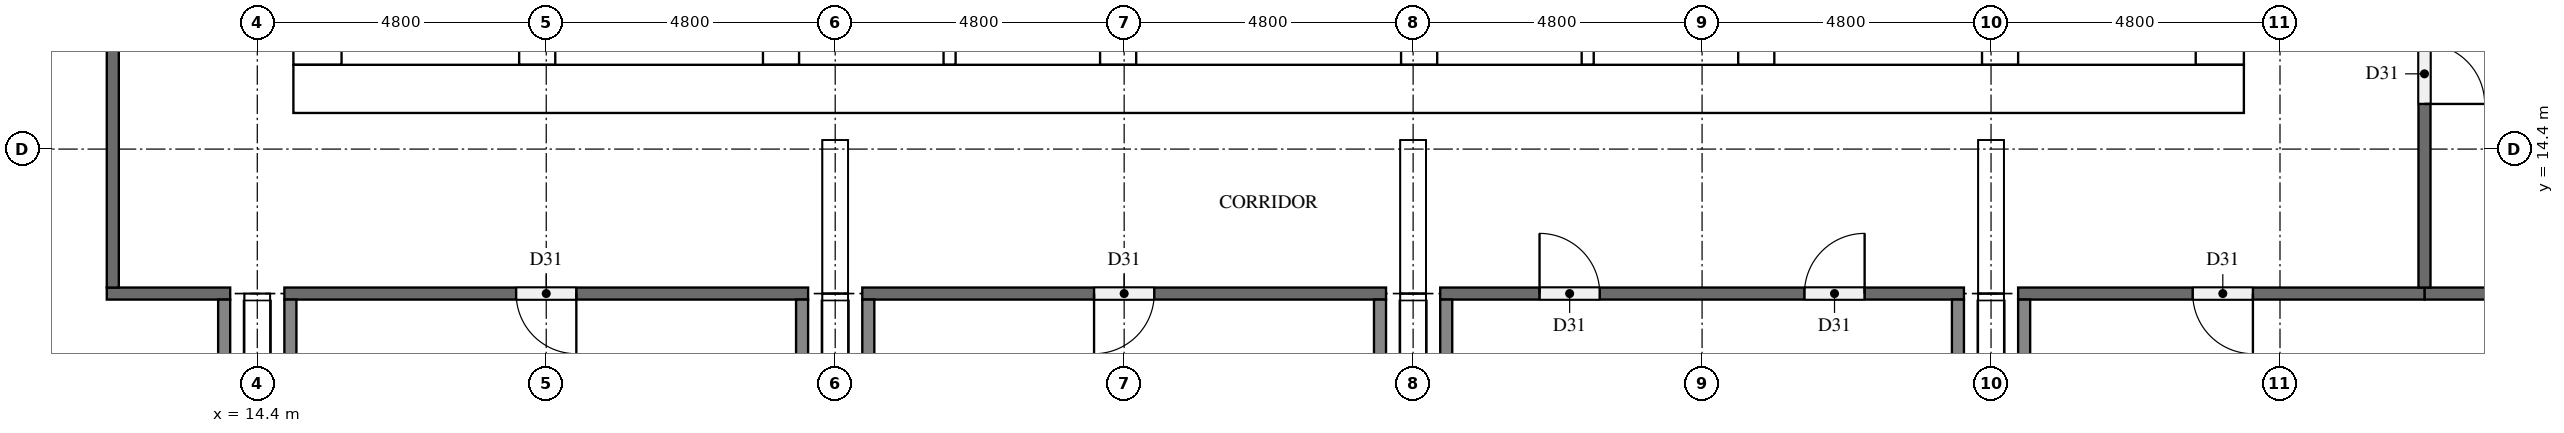
"""IFC4 building model, lengths in metres.
Left out: names, types, materials, properties, quantities, classifications, styles, units other than length and angle.
Written with IfcOpenShell. Run it as: python <this file> out.ifc"""

import sys

from ifc_helpers import new_model, si_unit, direction, frame, frame_2d, origin, place, context, subcontext, project, spatial, rectangle, extrude, element, fill, save


model = new_model("IFC4")
c1 = context("Model", 3, precision=1e-05, world=origin(), true_north=direction((0.0, 1.0)))
c2 = subcontext(c1, "Body", "Model", "MODEL_VIEW")
j1 = project(units=[si_unit("LENGTHUNIT", "METRE"), si_unit("PLANEANGLEUNIT", "RADIAN")], contexts=[c1])
p1 = place(None, origin())
s1 = spatial("IfcSite", under=j1, at=p1, CompositionType="ELEMENT")
p2 = place(p1, origin())
s2 = spatial("IfcBuilding", under=s1, at=p2, CompositionType="ELEMENT")
p3 = place(p2, frame((0.0, 0.0, 143.6)))
s3 = spatial("IfcBuildingStorey", under=s2, at=p3, CompositionType="ELEMENT", Elevation=143.6)
p4 = place(p3, frame((15.0, 15.4, 0.0), z_axis=(0.0, 0.0, 1.0), x_axis=(1.0, 0.0, 0.0)))
e1 = element("IfcWall", 1, at=p4, inside=s3, PredefinedType="SHEAR", context=c2, shape_type="SweptSolid", body=[
    extrude(rectangle(XDim=32.4, YDim=0.8, at=frame_2d((16.2, 0.0))), origin(), (0.0, 0.0, 1.0), 5.1),
])
p5 = place(p4, frame((15.3, 0.0, 0.0)))
e2 = element("IfcOpeningElement", 2, at=p5, cuts=e1, PredefinedType="OPENING", context=c2, shape_type="SweptSolid", body=[
    extrude(rectangle(XDim=1.8, YDim=2.1, at=frame_2d((0.9, 1.05))), frame((0.0, 0.41, 0.0), z_axis=(0.0, -1.0, 0.0), x_axis=(1.0, 0.0, 0.0)), (0.0, 0.0, 1.0), 0.82),
])
p6 = place(p3, frame((15.4, 15.8, 0.0), z_axis=(0.0, 0.0, 1.0), x_axis=(0.0, 1.0, 0.0)))
e3 = element("IfcWall", 3, at=p6, inside=s3, PredefinedType="SHEAR", context=c2, shape_type="SweptSolid", body=[
    extrude(rectangle(XDim=21.2, YDim=0.8, at=frame_2d((10.6, 0.0))), origin(), (0.0, 0.0, 1.0), 5.1),
])
p7 = place(p6, frame((4.96, 0.0, 0.0)))
e4 = element("IfcOpeningElement", 4, at=p7, cuts=e3, PredefinedType="OPENING", context=c2, shape_type="SweptSolid", body=[
    extrude(rectangle(XDim=1.2, YDim=2.1, at=frame_2d((0.6, 1.05))), frame((0.0, 0.41, 0.0), z_axis=(0.0, -1.0, 0.0), x_axis=(1.0, 0.0, 0.0)), (0.0, 0.0, 1.0), 0.82),
])
p8 = place(p3, frame((47.0, 15.8, 0.0), z_axis=(0.0, 0.0, 1.0), x_axis=(0.0, 1.0, 0.0)))
e5 = element("IfcWall", 5, at=p8, inside=s3, PredefinedType="SHEAR", context=c2, shape_type="SweptSolid", body=[
    extrude(rectangle(XDim=21.2, YDim=0.8, at=frame_2d((10.6, 0.0))), origin(), (0.0, 0.0, 1.0), 5.1),
])
p9 = place(p8, frame((10.3, 0.0, 0.0)))
e6 = element("IfcOpeningElement", 6, at=p9, cuts=e5, PredefinedType="OPENING", context=c2, shape_type="SweptSolid", body=[
    extrude(rectangle(XDim=1.2, YDim=2.1, at=frame_2d((0.6, 1.05))), frame((0.0, 0.41, 0.0), z_axis=(0.0, -1.0, 0.0), x_axis=(1.0, 0.0, 0.0)), (0.0, 0.0, 1.0), 0.82),
])
p10 = place(p3, frame((19.05, 15.8, 0.0), z_axis=(0.0, 0.0, 1.0), x_axis=(0.0, 1.0, 0.0)))
e7 = element("IfcWall", 7, at=p10, inside=s3, PredefinedType="SHEAR", context=c2, shape_type="SweptSolid", body=[
    extrude(rectangle(XDim=15.15, YDim=0.6, at=frame_2d((7.575, 0.0))), origin(), (0.0, 0.0, 1.0), 5.1),
])
p11 = place(p10, frame((9.65, 0.0, 0.0)))
e8 = element("IfcOpeningElement", 8, at=p11, cuts=e7, PredefinedType="OPENING", context=c2, shape_type="SweptSolid", body=[
    extrude(rectangle(XDim=1.1, YDim=2.1, at=frame_2d((0.55, 1.05))), frame((0.0, 0.31, 0.0), z_axis=(0.0, -1.0, 0.0), x_axis=(1.0, 0.0, 0.0)), (0.0, 0.0, 1.0), 0.62),
])
p12 = place(p10, frame((13.15, 0.0, 0.0)))
e9 = element("IfcOpeningElement", 9, at=p12, cuts=e7, PredefinedType="OPENING", context=c2, shape_type="SweptSolid", body=[
    extrude(rectangle(XDim=1.1, YDim=2.1, at=frame_2d((0.55, 1.05))), frame((0.0, 0.31, 0.0), z_axis=(0.0, -1.0, 0.0), x_axis=(1.0, 0.0, 0.0)), (0.0, 0.0, 1.0), 0.62),
])
p13 = place(p10, frame((0.4, 0.0, 0.0)))
e10 = element("IfcOpeningElement", 10, at=p13, cuts=e7, PredefinedType="OPENING", context=c2, shape_type="SweptSolid", body=[
    extrude(rectangle(XDim=1.2, YDim=2.1, at=frame_2d((0.6, 1.05))), frame((0.0, 0.31, 0.0), z_axis=(0.0, -1.0, 0.0), x_axis=(1.0, 0.0, 0.0)), (0.0, 0.0, 1.0), 0.62),
])
p14 = place(p3, frame((23.1, 15.8, 0.0), z_axis=(0.0, 0.0, 1.0), x_axis=(0.0, 1.0, 0.0)))
e11 = element("IfcWall", 11, at=p14, inside=s3, PredefinedType="SHEAR", context=c2, shape_type="SweptSolid", body=[
    extrude(rectangle(XDim=21.2, YDim=0.6, at=frame_2d((10.6, 0.0))), origin(), (0.0, 0.0, 1.0), 5.1),
])
p15 = place(p3, frame((39.3, 15.8, 0.0), z_axis=(0.0, 0.0, 1.0), x_axis=(0.0, 1.0, 0.0)))
e12 = element("IfcWall", 12, at=p15, inside=s3, PredefinedType="SHEAR", context=c2, shape_type="SweptSolid", body=[
    extrude(rectangle(XDim=8.45, YDim=0.6, at=frame_2d((4.225, 0.0))), origin(), (0.0, 0.0, 1.0), 5.1),
])
p16 = place(p3, frame((43.35, 15.8, 0.0), z_axis=(0.0, 0.0, 1.0), x_axis=(0.0, 1.0, 0.0)))
e13 = element("IfcWall", 13, at=p16, inside=s3, PredefinedType="SHEAR", context=c2, shape_type="SweptSolid", body=[
    extrude(rectangle(XDim=8.45, YDim=0.6, at=frame_2d((4.225, 0.0))), origin(), (0.0, 0.0, 1.0), 5.1),
])
p17 = place(p16, frame((0.4, 0.0, 0.0)))
e14 = element("IfcOpeningElement", 14, at=p17, cuts=e13, PredefinedType="OPENING", context=c2, shape_type="SweptSolid", body=[
    extrude(rectangle(XDim=1.2, YDim=2.1, at=frame_2d((0.6, 1.05))), frame((0.0, 0.31, 0.0), z_axis=(0.0, -1.0, 0.0), x_axis=(1.0, 0.0, 0.0)), (0.0, 0.0, 1.0), 0.62),
])
for number, where, z_axis, x_axis in (
    (15, (28.7, 15.8, 0.0), (0.0, 0.0, 1.0), (0.0, 1.0, 0.0)),
    (16, (33.7, 15.8, 0.0), (0.0, 0.0, 1.0), (0.0, 1.0, 0.0)),
):
    element("IfcWall", number, at=place(p3, frame(where, z_axis=z_axis, x_axis=x_axis)), inside=s3, PredefinedType="SHEAR", context=c2, shape_type="SweptSolid", body=[
        extrude(rectangle(XDim=2.65, YDim=0.6, at=frame_2d((1.325, 0.0))), origin(), (0.0, 0.0, 1.0), 5.1),
    ])
for number, where, z_axis, x_axis in (
    (17, (25.9, 15.8, 0.0), (0.0, 0.0, 1.0), (0.0, 1.0, 0.0)),
    (18, (36.5, 15.8, 0.0), (0.0, 0.0, 1.0), (0.0, 1.0, 0.0)),
):
    element("IfcWall", number, at=place(p3, frame(where, z_axis=z_axis, x_axis=x_axis)), inside=s3, PredefinedType="SOLIDWALL", context=c2, shape_type="SweptSolid", body=[
        extrude(rectangle(XDim=2.65, YDim=0.2, at=frame_2d((1.325, 0.0))), origin(), (0.0, 0.0, 1.0), 5.1),
    ])
p18 = place(p3, frame((50.4, 12.0, 0.0), z_axis=(0.0, 0.0, 1.0), x_axis=(1.0, 0.0, 0.0)))
e19 = element("IfcWall", 19, at=p18, inside=s3, PredefinedType="PARTITIONING", context=c2, shape_type="SweptSolid", body=[
    extrude(rectangle(XDim=1.75, YDim=0.2, at=frame_2d((0.875, 0.0))), origin(), (0.0, 0.0, 1.0), 5.1),
])
p19 = place(p3, frame((11.9, 12.0, 0.0), z_axis=(0.0, 0.0, 1.0), x_axis=(1.0, 0.0, 0.0)))
e20 = element("IfcWall", 20, at=p19, inside=s3, PredefinedType="PARTITIONING", context=c2, shape_type="SweptSolid", body=[
    extrude(rectangle(XDim=2.05, YDim=0.2, at=frame_2d((1.025, 0.0))), origin(), (0.0, 0.0, 1.0), 5.1),
])
p20 = place(p3, frame((23.55, 12.0, 0.0), z_axis=(0.0, 0.0, 1.0), x_axis=(-1.0, 0.0, 0.0)))
e21 = element("IfcWall", 21, at=p20, inside=s3, PredefinedType="PARTITIONING", context=c2, shape_type="SweptSolid", body=[
    extrude(rectangle(XDim=8.7, YDim=0.2, at=frame_2d((4.35, 0.0))), origin(), (0.0, 0.0, 1.0), 5.1),
])
p21 = place(p20, frame((3.85, 0.0, 0.0)))
e22 = element("IfcOpeningElement", 22, at=p21, cuts=e21, PredefinedType="OPENING", context=c2, shape_type="SweptSolid", body=[
    extrude(rectangle(XDim=1.0, YDim=2.1, at=frame_2d((0.5, 1.05))), frame((0.0, 0.11, 0.0), z_axis=(0.0, -1.0, 0.0), x_axis=(1.0, 0.0, 0.0)), (0.0, 0.0, 1.0), 0.22),
])
p22 = place(p3, frame((33.15, 12.0, 0.0), z_axis=(0.0, 0.0, 1.0), x_axis=(-1.0, 0.0, 0.0)))
e23 = element("IfcWall", 23, at=p22, inside=s3, PredefinedType="PARTITIONING", context=c2, shape_type="SweptSolid", body=[
    extrude(rectangle(XDim=8.7, YDim=0.2, at=frame_2d((4.35, 0.0))), origin(), (0.0, 0.0, 1.0), 5.1),
])
p23 = place(p22, frame((3.85, 0.0, 0.0)))
e24 = element("IfcOpeningElement", 24, at=p23, cuts=e23, PredefinedType="OPENING", context=c2, shape_type="SweptSolid", body=[
    extrude(rectangle(XDim=1.0, YDim=2.1, at=frame_2d((0.5, 1.05))), frame((0.0, 0.11, 0.0), z_axis=(0.0, -1.0, 0.0), x_axis=(1.0, 0.0, 0.0)), (0.0, 0.0, 1.0), 0.22),
])
p24 = place(p3, frame((34.05, 12.0, 0.0), z_axis=(0.0, 0.0, 1.0), x_axis=(1.0, 0.0, 0.0)))
e25 = element("IfcWall", 25, at=p24, inside=s3, PredefinedType="PARTITIONING", context=c2, shape_type="SweptSolid", body=[
    extrude(rectangle(XDim=8.7, YDim=0.2, at=frame_2d((4.35, 0.0))), origin(), (0.0, 0.0, 1.0), 5.1),
])
p25 = place(p24, frame((6.05, 0.0, 0.0)))
e26 = element("IfcOpeningElement", 26, at=p25, cuts=e25, PredefinedType="OPENING", context=c2, shape_type="SweptSolid", body=[
    extrude(rectangle(XDim=1.0, YDim=2.1, at=frame_2d((0.5, 1.05))), frame((0.0, 0.11, 0.0), z_axis=(0.0, -1.0, 0.0), x_axis=(1.0, 0.0, 0.0)), (0.0, 0.0, 1.0), 0.22),
])
p26 = place(p24, frame((1.65, 0.0, 0.0)))
e27 = element("IfcOpeningElement", 27, at=p26, cuts=e25, PredefinedType="OPENING", context=c2, shape_type="SweptSolid", body=[
    extrude(rectangle(XDim=1.0, YDim=2.1, at=frame_2d((0.5, 1.05))), frame((0.0, 0.11, 0.0), z_axis=(0.0, -1.0, 0.0), x_axis=(1.0, 0.0, 0.0)), (0.0, 0.0, 1.0), 0.22),
])
p27 = place(p3, frame((50.4, 12.0, 0.0), z_axis=(0.0, 0.0, 1.0), x_axis=(-1.0, 0.0, 0.0)))
e28 = element("IfcWall", 28, at=p27, inside=s3, PredefinedType="PARTITIONING", context=c2, shape_type="SweptSolid", body=[
    extrude(rectangle(XDim=6.75, YDim=0.2, at=frame_2d((3.375, 0.0))), origin(), (0.0, 0.0, 1.0), 5.1),
])
p28 = place(p27, frame((2.85, 0.0, 0.0)))
e29 = element("IfcOpeningElement", 29, at=p28, cuts=e28, PredefinedType="OPENING", context=c2, shape_type="SweptSolid", body=[
    extrude(rectangle(XDim=1.0, YDim=2.1, at=frame_2d((0.5, 1.05))), frame((0.0, 0.11, 0.0), z_axis=(0.0, -1.0, 0.0), x_axis=(1.0, 0.0, 0.0)), (0.0, 0.0, 1.0), 0.22),
])
p29 = place(p3, frame((12.0, 12.1, 0.0), z_axis=(0.0, 0.0, 1.0), x_axis=(0.0, 1.0, 0.0)))
e30 = element("IfcWall", 30, at=p29, inside=s3, PredefinedType="PARTITIONING", context=c2, shape_type="SweptSolid", body=[
    extrude(rectangle(XDim=28.6, YDim=0.2, at=frame_2d((14.3, 0.0))), origin(), (0.0, 0.0, 1.0), 5.1),
])
p30 = place(p29, frame((5.45, 0.0, 0.0)))
e31 = element("IfcOpeningElement", 31, at=p30, cuts=e30, PredefinedType="OPENING", context=c2, shape_type="SweptSolid", body=[
    extrude(rectangle(XDim=1.0, YDim=2.1, at=frame_2d((0.5, 1.05))), frame((0.0, 0.11, 0.0), z_axis=(0.0, -1.0, 0.0), x_axis=(1.0, 0.0, 0.0)), (0.0, 0.0, 1.0), 0.22),
])
p31 = place(p29, frame((13.85, 0.0, 0.0)))
e32 = element("IfcOpeningElement", 32, at=p31, cuts=e30, PredefinedType="OPENING", context=c2, shape_type="SweptSolid", body=[
    extrude(rectangle(XDim=1.0, YDim=2.1, at=frame_2d((0.5, 1.05))), frame((0.0, 0.11, 0.0), z_axis=(0.0, -1.0, 0.0), x_axis=(1.0, 0.0, 0.0)), (0.0, 0.0, 1.0), 0.22),
])
p32 = place(p29, frame((18.65, 0.0, 0.0)))
e33 = element("IfcOpeningElement", 33, at=p32, cuts=e30, PredefinedType="OPENING", context=c2, shape_type="SweptSolid", body=[
    extrude(rectangle(XDim=1.0, YDim=2.1, at=frame_2d((0.5, 1.05))), frame((0.0, 0.11, 0.0), z_axis=(0.0, -1.0, 0.0), x_axis=(1.0, 0.0, 0.0)), (0.0, 0.0, 1.0), 0.22),
])
p33 = place(p29, frame((24.55, 0.0, 0.0)))
e34 = element("IfcOpeningElement", 34, at=p33, cuts=e30, PredefinedType="OPENING", context=c2, shape_type="SweptSolid", body=[
    extrude(rectangle(XDim=1.0, YDim=2.1, at=frame_2d((0.5, 1.05))), frame((0.0, 0.11, 0.0), z_axis=(0.0, -1.0, 0.0), x_axis=(1.0, 0.0, 0.0)), (0.0, 0.0, 1.0), 0.22),
])
for number, where, z_axis, x_axis in (
    (35, (13.85, 2.3, 0.0), (0.0, 0.0, 1.0), (0.0, 1.0, 0.0)),
    (36, (14.95, 2.3, 0.0), (0.0, 0.0, 1.0), (0.0, 1.0, 0.0)),
    (37, (23.45, 2.3, 0.0), (0.0, 0.0, 1.0), (0.0, 1.0, 0.0)),
    (38, (24.55, 2.3, 0.0), (0.0, 0.0, 1.0), (0.0, 1.0, 0.0)),
    (39, (33.05, 2.3, 0.0), (0.0, 0.0, 1.0), (0.0, 1.0, 0.0)),
    (40, (34.15, 2.3, 0.0), (0.0, 0.0, 1.0), (0.0, 1.0, 0.0)),
    (41, (42.65, 2.3, 0.0), (0.0, 0.0, 1.0), (0.0, 1.0, 0.0)),
    (42, (43.75, 2.3, 0.0), (0.0, 0.0, 1.0), (0.0, 1.0, 0.0)),
):
    element("IfcWall", number, at=place(p3, frame(where, z_axis=z_axis, x_axis=x_axis)), inside=s3, PredefinedType="PARTITIONING", context=c2, shape_type="SweptSolid", body=[
        extrude(rectangle(XDim=9.6, YDim=0.2, at=frame_2d((4.8, 0.0))), origin(), (0.0, 0.0, 1.0), 5.1),
    ])
p34 = place(p3, frame((50.4, 40.7, 0.0), z_axis=(0.0, 0.0, 1.0), x_axis=(0.0, -1.0, 0.0)))
e43 = element("IfcWall", 43, at=p34, inside=s3, PredefinedType="PARTITIONING", context=c2, shape_type="SweptSolid", body=[
    extrude(rectangle(XDim=28.6, YDim=0.2, at=frame_2d((14.3, 0.0))), origin(), (0.0, 0.0, 1.0), 5.1),
])
p35 = place(p34, frame((24.55, 0.0, 0.0)))
e44 = element("IfcOpeningElement", 44, at=p35, cuts=e43, PredefinedType="OPENING", context=c2, shape_type="SweptSolid", body=[
    extrude(rectangle(XDim=1.0, YDim=2.1, at=frame_2d((0.5, 1.05))), frame((0.0, 0.11, 0.0), z_axis=(0.0, -1.0, 0.0), x_axis=(1.0, 0.0, 0.0)), (0.0, 0.0, 1.0), 0.22),
])
p36 = place(p34, frame((18.65, 0.0, 0.0)))
e45 = element("IfcOpeningElement", 45, at=p36, cuts=e43, PredefinedType="OPENING", context=c2, shape_type="SweptSolid", body=[
    extrude(rectangle(XDim=1.0, YDim=2.1, at=frame_2d((0.5, 1.05))), frame((0.0, 0.11, 0.0), z_axis=(0.0, -1.0, 0.0), x_axis=(1.0, 0.0, 0.0)), (0.0, 0.0, 1.0), 0.22),
])
p37 = place(p34, frame((13.85, 0.0, 0.0)))
e46 = element("IfcOpeningElement", 46, at=p37, cuts=e43, PredefinedType="OPENING", context=c2, shape_type="SweptSolid", body=[
    extrude(rectangle(XDim=1.0, YDim=2.1, at=frame_2d((0.5, 1.05))), frame((0.0, 0.11, 0.0), z_axis=(0.0, -1.0, 0.0), x_axis=(1.0, 0.0, 0.0)), (0.0, 0.0, 1.0), 0.22),
])
p38 = place(p34, frame((9.05, 0.0, 0.0)))
e47 = element("IfcOpeningElement", 47, at=p38, cuts=e43, PredefinedType="OPENING", context=c2, shape_type="SweptSolid", body=[
    extrude(rectangle(XDim=1.0, YDim=2.1, at=frame_2d((0.5, 1.05))), frame((0.0, 0.11, 0.0), z_axis=(0.0, -1.0, 0.0), x_axis=(1.0, 0.0, 0.0)), (0.0, 0.0, 1.0), 0.22),
])
p39 = place(p34, frame((3.05, 0.0, 0.0)))
e48 = element("IfcOpeningElement", 48, at=p39, cuts=e43, PredefinedType="OPENING", context=c2, shape_type="SweptSolid", body=[
    extrude(rectangle(XDim=1.0, YDim=2.1, at=frame_2d((0.5, 1.05))), frame((0.0, 0.11, 0.0), z_axis=(0.0, -1.0, 0.0), x_axis=(1.0, 0.0, 0.0)), (0.0, 0.0, 1.0), 0.22),
])
p40 = place(p5, frame((1.8, 0.0, 0.0), z_axis=(0.0, 0.0, 1.0), x_axis=(-1.0, 0.0, 0.0)))
e49 = element("IfcDoor", 49, at=p40, inside=s3, OperationType="DOUBLE_DOOR_SINGLE_SWING", PredefinedType="DOOR", context=c2, shape_type="SweptSolid", body=[
    extrude(rectangle(XDim=1.8, YDim=2.1, at=frame_2d((0.9, 1.05))), frame((0.0, 0.025, 0.0), z_axis=(0.0, -1.0, 0.0), x_axis=(1.0, 0.0, 0.0)), (0.0, 0.0, 1.0), 0.05),
])
fill(e2, e49)
p41 = place(p21, origin())
e50 = element("IfcDoor", 50, at=p41, inside=s3, OperationType="SINGLE_SWING_LEFT", PredefinedType="DOOR", context=c2, shape_type="SweptSolid", body=[
    extrude(rectangle(XDim=1.0, YDim=2.1, at=frame_2d((0.5, 1.05))), frame((0.0, 0.025, 0.0), z_axis=(0.0, -1.0, 0.0), x_axis=(1.0, 0.0, 0.0)), (0.0, 0.0, 1.0), 0.05),
])
fill(e22, e50)
p42 = place(p23, origin())
e51 = element("IfcDoor", 51, at=p42, inside=s3, OperationType="SINGLE_SWING_RIGHT", PredefinedType="DOOR", context=c2, shape_type="SweptSolid", body=[
    extrude(rectangle(XDim=1.0, YDim=2.1, at=frame_2d((0.5, 1.05))), frame((0.0, 0.025, 0.0), z_axis=(0.0, -1.0, 0.0), x_axis=(1.0, 0.0, 0.0)), (0.0, 0.0, 1.0), 0.05),
])
fill(e24, e51)
p43 = place(p25, origin())
e52 = element("IfcDoor", 52, at=p43, inside=s3, OperationType="SINGLE_SWING_RIGHT", PredefinedType="DOOR", context=c2, shape_type="SweptSolid", body=[
    extrude(rectangle(XDim=1.0, YDim=2.1, at=frame_2d((0.5, 1.05))), frame((0.0, 0.025, 0.0), z_axis=(0.0, -1.0, 0.0), x_axis=(1.0, 0.0, 0.0)), (0.0, 0.0, 1.0), 0.05),
])
fill(e26, e52)
p44 = place(p26, origin())
e53 = element("IfcDoor", 53, at=p44, inside=s3, OperationType="SINGLE_SWING_LEFT", PredefinedType="DOOR", context=c2, shape_type="SweptSolid", body=[
    extrude(rectangle(XDim=1.0, YDim=2.1, at=frame_2d((0.5, 1.05))), frame((0.0, 0.025, 0.0), z_axis=(0.0, -1.0, 0.0), x_axis=(1.0, 0.0, 0.0)), (0.0, 0.0, 1.0), 0.05),
])
fill(e27, e53)
p45 = place(p28, origin())
e54 = element("IfcDoor", 54, at=p45, inside=s3, OperationType="SINGLE_SWING_LEFT", PredefinedType="DOOR", context=c2, shape_type="SweptSolid", body=[
    extrude(rectangle(XDim=1.0, YDim=2.1, at=frame_2d((0.5, 1.05))), frame((0.0, 0.025, 0.0), z_axis=(0.0, -1.0, 0.0), x_axis=(1.0, 0.0, 0.0)), (0.0, 0.0, 1.0), 0.05),
])
fill(e29, e54)
p46 = place(p35, origin())
e55 = element("IfcDoor", 55, at=p46, inside=s3, OperationType="SINGLE_SWING_RIGHT", PredefinedType="DOOR", context=c2, shape_type="SweptSolid", body=[
    extrude(rectangle(XDim=1.0, YDim=2.1, at=frame_2d((0.5, 1.05))), frame((0.0, 0.025, 0.0), z_axis=(0.0, -1.0, 0.0), x_axis=(1.0, 0.0, 0.0)), (0.0, 0.0, 1.0), 0.05),
])
fill(e44, e55)
save(model, sys.argv[1])
